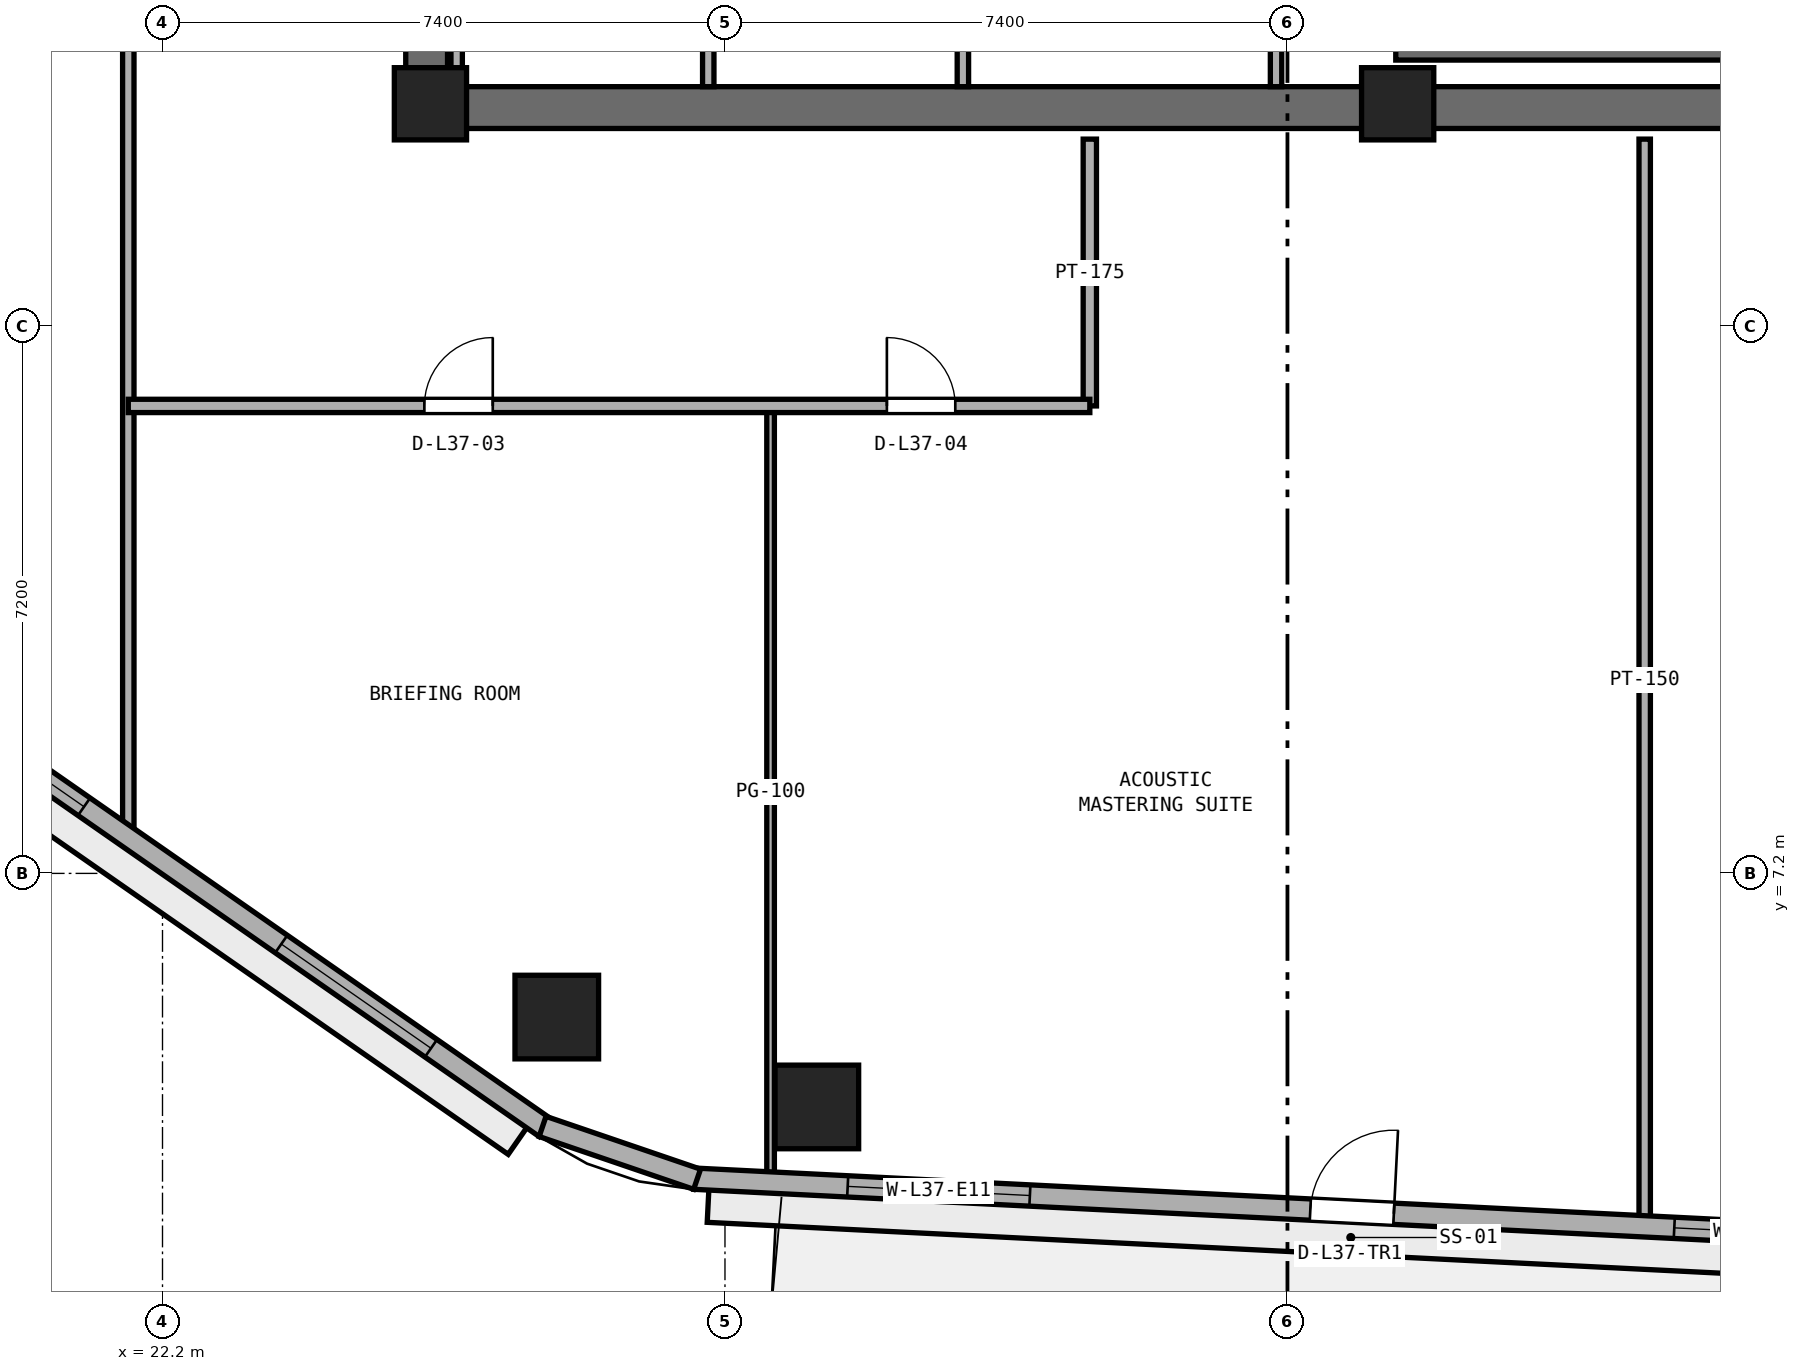
"""IFC4 building model, lengths in metres.
Left out: names, types, materials, properties, quantities, classifications, styles, units other than length and angle.
Written with IfcOpenShell. Run it as: python <this file> out.ifc"""

import sys

from ifc_helpers import new_model, si_unit, direction, frame, frame_2d, origin, origin_2d, place, context, subcontext, project, spatial, rectangle, extrude, element, fill, save


model = new_model("IFC4")
c1 = context("Model", 3, precision=1e-05, world=origin(), true_north=direction((0.0, 1.0)))
c2 = subcontext(c1, "Body", "Model", "MODEL_VIEW")
j1 = project(units=[si_unit("LENGTHUNIT", "METRE"), si_unit("PLANEANGLEUNIT", "RADIAN")], contexts=[c1])
p1 = place(None, origin())
s1 = spatial("IfcSite", under=j1, at=p1, CompositionType="ELEMENT")
p2 = place(p1, origin())
s2 = spatial("IfcBuilding", under=s1, at=p2, CompositionType="ELEMENT")
p3 = place(p2, frame((0.0, 0.0, 147.8)))
s3 = spatial("IfcBuildingStorey", under=s2, at=p3, CompositionType="ELEMENT", Elevation=147.8)
p4 = place(p3, frame((25.4, 17.275, 0.0), z_axis=(0.0, 0.0, 1.0), x_axis=(1.0, 0.0, 0.0)))
e1 = element("IfcWall", 1, at=p4, inside=s3, PredefinedType="SHEAR", context=c2, shape_type="SweptSolid", body=[
    extrude(rectangle(XDim=23.2, YDim=0.55, at=frame_2d((11.6, 0.0))), origin(), (0.0, 0.0, 1.0), 3.54),
])
p5 = place(p3, frame((25.675, 17.55, 0.0), z_axis=(0.0, 0.0, 1.0), x_axis=(0.0, 1.0, 0.0)))
e2 = element("IfcWall", 2, at=p5, inside=s3, PredefinedType="SHEAR", context=c2, shape_type="SweptSolid", body=[
    extrude(rectangle(XDim=15.3, YDim=0.55, at=frame_2d((7.65, 0.0))), origin(), (0.0, 0.0, 1.0), 3.54),
])
p6 = place(p5, frame((6.9, 0.0, 0.0)))
e3 = element("IfcOpeningElement", 3, at=p6, cuts=e2, PredefinedType="OPENING", context=c2, shape_type="SweptSolid", body=[
    extrude(rectangle(XDim=1.5, YDim=2.15, at=frame_2d((0.75, 1.075))), frame((0.0, 0.285, 0.0), z_axis=(0.0, -1.0, 0.0), x_axis=(1.0, 0.0, 0.0)), (0.0, 0.0, 1.0), 0.57),
])
for number, where, z_axis, x_axis in (
    (4, (25.725, 17.325, 0.0), (0.0, 0.0, 1.0), (1.0, 0.0, 0.0)),
    (5, (38.45, 17.325, 0.0), (0.0, 0.0, 1.0), (1.0, 0.0, 0.0)),
):
    element("IfcColumn", number, at=place(p3, frame(where, z_axis=z_axis, x_axis=x_axis)), inside=s3, PredefinedType="PILASTER", context=c2, shape_type="SweptSolid", body=[
        extrude(rectangle(XDim=0.95, YDim=0.95, at=origin_2d()), origin(), (0.0, 0.0, 1.0), 3.8),
    ])
for number, where, z_axis, x_axis in (
    (6, (30.809, 4.127, 0.0), (0.0, 0.0, 1.0), (1.0, 0.0, 0.0)),
    (7, (27.387, 5.31, 0.0), (0.0, 0.0, 1.0), (1.0, 0.0, 0.0)),
):
    element("IfcColumn", number, at=place(p3, frame(where, z_axis=z_axis, x_axis=x_axis)), inside=s3, PredefinedType="COLUMN", context=c2, shape_type="SweptSolid", body=[
        extrude(rectangle(XDim=1.1, YDim=1.1, at=origin_2d()), origin(), (0.0, 0.0, 1.0), 3.8),
    ])
p7 = place(p3, frame((38.425, 18.025, 0.0), z_axis=(0.0, 0.0, 1.0), x_axis=(1.0, 0.0, 0.0)))
e8 = element("IfcWall", 8, at=p7, inside=s3, PredefinedType="SHEAR", context=c2, shape_type="SweptSolid", body=[
    extrude(rectangle(XDim=7.3, YDim=0.25, at=frame_2d((3.65, 0.0))), origin(), (0.0, 0.0, 1.0), 3.54),
])
p8 = place(p3, frame((26.07, 17.55, 0.0), z_axis=(0.0, 0.0, 1.0), x_axis=(0.0, 1.0, 0.0)))
e9 = element("IfcWall", 9, at=p8, inside=s3, PredefinedType="PARTITIONING", context=c2, shape_type="SweptSolid", body=[
    extrude(rectangle(XDim=2.2, YDim=0.15, at=frame_2d((1.1, 0.0))), origin(), (0.0, 0.0, 1.0), 2.64),
])
for number, where, z_axis, x_axis in (
    (10, (29.38, 17.55, 0.0), (0.0, 0.0, 1.0), (0.0, 1.0, 0.0)),
    (11, (32.73, 17.55, 0.0), (0.0, 0.0, 1.0), (0.0, 1.0, 0.0)),
    (12, (36.85, 17.55, 0.0), (0.0, 0.0, 1.0), (0.0, 1.0, 0.0)),
):
    element("IfcWall", number, at=place(p3, frame(where, z_axis=z_axis, x_axis=x_axis)), inside=s3, PredefinedType="PARTITIONING", context=c2, shape_type="SweptSolid", body=[
        extrude(rectangle(XDim=2.2, YDim=0.15, at=frame_2d((1.1, 0.0))), origin(), (0.0, 0.0, 1.0), 3.54),
    ])
p9 = place(p3, frame((41.7, 2.621, 0.0), z_axis=(0.0, 0.0, 1.0), x_axis=(0.0, 1.0, 0.0)))
e13 = element("IfcWall", 13, at=p9, inside=s3, PredefinedType="PARTITIONING", context=c2, shape_type="SweptSolid", body=[
    extrude(rectangle(XDim=14.239, YDim=0.15, at=frame_2d((7.119, 0.0))), origin(), (0.0, 0.0, 1.0), 3.54),
])
p10 = place(p3, frame((34.4, 13.35, 0.0), z_axis=(0.0, 0.0, 1.0), x_axis=(0.0, 1.0, 0.0)))
e14 = element("IfcWall", 14, at=p10, inside=s3, PredefinedType="PARTITIONING", context=c2, shape_type="SweptSolid", body=[
    extrude(rectangle(XDim=3.51, YDim=0.175, at=frame_2d((1.755, 0.0))), origin(), (0.0, 0.0, 1.0), 3.54),
])
p11 = place(p3, frame((30.2, 3.198, 0.0), z_axis=(0.0, 0.0, 1.0), x_axis=(0.0, 1.0, 0.0)))
e15 = element("IfcWall", 15, at=p11, inside=s3, PredefinedType="PARTITIONING", context=c2, shape_type="SweptSolid", body=[
    extrude(rectangle(XDim=10.152, YDim=0.1, at=frame_2d((5.076, 0.0))), origin(), (0.0, 0.0, 1.0), 3.54),
])
p12 = place(p3, frame((21.75, 7.641, 0.0), z_axis=(0.0, 0.0, 1.0), x_axis=(0.0, 1.0, 0.0)))
e16 = element("IfcWall", 16, at=p12, inside=s3, PredefinedType="PARTITIONING", context=c2, shape_type="SweptSolid", body=[
    extrude(rectangle(XDim=16.209, YDim=0.15, at=frame_2d((8.104, 0.0))), origin(), (0.0, 0.0, 1.0), 3.54),
])
p13 = place(p12, frame((10.389, 0.0, 0.0)))
e17 = element("IfcOpeningElement", 17, at=p13, cuts=e16, PredefinedType="OPENING", context=c2, shape_type="SweptSolid", body=[
    extrude(rectangle(XDim=0.9, YDim=2.1, at=frame_2d((0.45, 1.05))), frame((0.0, 0.085, 0.0), z_axis=(0.0, -1.0, 0.0), x_axis=(1.0, 0.0, 0.0)), (0.0, 0.0, 1.0), 0.17),
])
p14 = place(p3, frame((21.75, 13.35, 0.0), z_axis=(0.0, 0.0, 1.0), x_axis=(1.0, 0.0, 0.0)))
e18 = element("IfcWall", 18, at=p14, inside=s3, PredefinedType="PARTITIONING", context=c2, shape_type="SweptSolid", body=[
    extrude(rectangle(XDim=12.65, YDim=0.175, at=frame_2d((6.325, 0.0))), origin(), (0.0, 0.0, 1.0), 3.54),
])
p15 = place(p14, frame((3.895, 0.0, 0.0)))
e19 = element("IfcOpeningElement", 19, at=p15, cuts=e18, PredefinedType="OPENING", context=c2, shape_type="SweptSolid", body=[
    extrude(rectangle(XDim=0.9, YDim=2.1, at=frame_2d((0.45, 1.05))), frame((0.0, 0.097, 0.0), z_axis=(0.0, -1.0, 0.0), x_axis=(1.0, 0.0, 0.0)), (0.0, 0.0, 1.0), 0.195),
])
p16 = place(p14, frame((9.98, 0.0, 0.0)))
e20 = element("IfcOpeningElement", 20, at=p16, cuts=e18, PredefinedType="OPENING", context=c2, shape_type="SweptSolid", body=[
    extrude(rectangle(XDim=0.9, YDim=2.1, at=frame_2d((0.45, 1.05))), frame((0.0, 0.097, 0.0), z_axis=(0.0, -1.0, 0.0), x_axis=(1.0, 0.0, 0.0)), (0.0, 0.0, 1.0), 0.195),
])
p17 = place(p3, frame((29.195, 3.184, 0.0), z_axis=(0.0, 0.0, 1.0), x_axis=(0.998743400978, -0.05011605535, 0.0)))
e21 = element("IfcWall", 21, at=p17, inside=s3, PredefinedType="STANDARD", context=c2, shape_type="SweptSolid", body=[
    extrude(rectangle(XDim=17.333, YDim=0.28, at=frame_2d((8.667, 0.0))), origin(), (0.0, 0.0, 1.0), 3.54),
])
p18 = place(p17, frame((8.116, 0.0, 0.0)))
e22 = element("IfcOpeningElement", 22, at=p18, cuts=e21, PredefinedType="OPENING", context=c2, shape_type="SweptSolid", body=[
    extrude(rectangle(XDim=1.1, YDim=2.2, at=frame_2d((0.55, 1.1))), frame((0.0, 0.15, 0.0), z_axis=(0.0, -1.0, 0.0), x_axis=(1.0, 0.0, 0.0)), (0.0, 0.0, 1.0), 0.3),
])
p19 = place(p17, frame((2.022, 0.0, 0.9)))
e23 = element("IfcOpeningElement", 23, at=p19, cuts=e21, PredefinedType="OPENING", context=c2, shape_type="SweptSolid", body=[
    extrude(rectangle(XDim=2.4, YDim=1.75, at=frame_2d((1.2, 0.875))), frame((0.0, 0.15, 0.0), z_axis=(0.0, -1.0, 0.0), x_axis=(1.0, 0.0, 0.0)), (0.0, 0.0, 1.0), 0.3),
])
p20 = place(p17, frame((12.911, 0.0, 0.9)))
e24 = element("IfcOpeningElement", 24, at=p20, cuts=e21, PredefinedType="OPENING", context=c2, shape_type="SweptSolid", body=[
    extrude(rectangle(XDim=2.4, YDim=1.75, at=frame_2d((1.2, 0.875))), frame((0.0, 0.15, 0.0), z_axis=(0.0, -1.0, 0.0), x_axis=(1.0, 0.0, 0.0)), (0.0, 0.0, 1.0), 0.3),
])
p21 = place(p3, frame((13.952, 13.101, 0.0), z_axis=(0.0, 0.0, 1.0), x_axis=(0.820698239491, -0.571361881558, 0.0)))
e25 = element("IfcWall", 25, at=p21, inside=s3, PredefinedType="STANDARD", context=c2, shape_type="SweptSolid", body=[
    extrude(rectangle(XDim=16.186, YDim=0.28, at=frame_2d((8.093, 0.0))), origin(), (0.0, 0.0, 1.0), 3.54),
])
p22 = place(p21, frame((1.831, 0.0, 0.9)))
e26 = element("IfcOpeningElement", 26, at=p22, cuts=e25, PredefinedType="OPENING", context=c2, shape_type="SweptSolid", body=[
    extrude(rectangle(XDim=2.4, YDim=1.75, at=frame_2d((1.2, 0.875))), frame((0.0, 0.15, 0.0), z_axis=(0.0, -1.0, 0.0), x_axis=(1.0, 0.0, 0.0)), (0.0, 0.0, 1.0), 0.3),
])
p23 = place(p21, frame((6.393, 0.0, 0.9)))
e27 = element("IfcOpeningElement", 27, at=p23, cuts=e25, PredefinedType="OPENING", context=c2, shape_type="SweptSolid", body=[
    extrude(rectangle(XDim=2.4, YDim=1.75, at=frame_2d((1.2, 0.875))), frame((0.0, 0.15, 0.0), z_axis=(0.0, -1.0, 0.0), x_axis=(1.0, 0.0, 0.0)), (0.0, 0.0, 1.0), 0.3),
])
p24 = place(p21, frame((11.955, 0.0, 0.9)))
e28 = element("IfcOpeningElement", 28, at=p24, cuts=e25, PredefinedType="OPENING", context=c2, shape_type="SweptSolid", body=[
    extrude(rectangle(XDim=2.4, YDim=1.75, at=frame_2d((1.2, 0.875))), frame((0.0, 0.15, 0.0), z_axis=(0.0, -1.0, 0.0), x_axis=(1.0, 0.0, 0.0)), (0.0, 0.0, 1.0), 0.3),
])
p25 = place(p3, frame((27.2, 3.871, 0.0), z_axis=(0.0, 0.0, 1.0), x_axis=(0.946327814955, -0.323208395068, 0.0)))
e29 = element("IfcWall", 29, at=p25, inside=s3, PredefinedType="STANDARD", context=c2, shape_type="SweptSolid", body=[
    extrude(rectangle(XDim=2.148, YDim=0.28, at=frame_2d((1.074, 0.0))), origin(), (0.0, 0.0, 1.0), 3.54),
])
p26 = place(p15, origin())
e30 = element("IfcDoor", 30, at=p26, inside=s3, OperationType="SINGLE_SWING_RIGHT", PredefinedType="DOOR", context=c2, shape_type="SweptSolid", body=[
    extrude(rectangle(XDim=0.9, YDim=2.1, at=frame_2d((0.45, 1.05))), frame((0.0, 0.025, 0.0), z_axis=(0.0, -1.0, 0.0), x_axis=(1.0, 0.0, 0.0)), (0.0, 0.0, 1.0), 0.05),
])
fill(e19, e30)
p27 = place(p16, origin())
e31 = element("IfcDoor", 31, at=p27, inside=s3, OperationType="SINGLE_SWING_LEFT", PredefinedType="DOOR", context=c2, shape_type="SweptSolid", body=[
    extrude(rectangle(XDim=0.9, YDim=2.1, at=frame_2d((0.45, 1.05))), frame((0.0, 0.025, 0.0), z_axis=(0.0, -1.0, 0.0), x_axis=(1.0, 0.0, 0.0)), (0.0, 0.0, 1.0), 0.05),
])
fill(e20, e31)
p28 = place(p18, origin())
e32 = element("IfcDoor", 32, at=p28, inside=s3, OperationType="SINGLE_SWING_RIGHT", PredefinedType="DOOR", context=c2, shape_type="SweptSolid", body=[
    extrude(rectangle(XDim=1.1, YDim=2.2, at=frame_2d((0.55, 1.1))), frame((0.0, 0.025, 0.0), z_axis=(0.0, -1.0, 0.0), x_axis=(1.0, 0.0, 0.0)), (0.0, 0.0, 1.0), 0.05),
])
fill(e22, e32)
p29 = place(p19, origin())
e33 = element("IfcWindow", 33, at=p29, inside=s3, PartitioningType="SINGLE_PANEL", PredefinedType="WINDOW", context=c2, shape_type="SweptSolid", body=[
    extrude(rectangle(XDim=2.4, YDim=1.75, at=frame_2d((1.2, 0.875))), frame((0.0, 0.03, 0.0), z_axis=(0.0, -1.0, 0.0), x_axis=(1.0, 0.0, 0.0)), (0.0, 0.0, 1.0), 0.06),
])
fill(e23, e33)
p30 = place(p20, origin())
e34 = element("IfcWindow", 34, at=p30, inside=s3, PartitioningType="SINGLE_PANEL", PredefinedType="WINDOW", context=c2, shape_type="SweptSolid", body=[
    extrude(rectangle(XDim=2.4, YDim=1.75, at=frame_2d((1.2, 0.875))), frame((0.0, 0.03, 0.0), z_axis=(0.0, -1.0, 0.0), x_axis=(1.0, 0.0, 0.0)), (0.0, 0.0, 1.0), 0.06),
])
fill(e24, e34)
p31 = place(p23, origin())
e35 = element("IfcWindow", 35, at=p31, inside=s3, PartitioningType="SINGLE_PANEL", PredefinedType="WINDOW", context=c2, shape_type="SweptSolid", body=[
    extrude(rectangle(XDim=2.4, YDim=1.75, at=frame_2d((1.2, 0.875))), frame((0.0, 0.03, 0.0), z_axis=(0.0, -1.0, 0.0), x_axis=(1.0, 0.0, 0.0)), (0.0, 0.0, 1.0), 0.06),
])
fill(e27, e35)
p32 = place(p24, origin())
e36 = element("IfcWindow", 36, at=p32, inside=s3, PartitioningType="SINGLE_PANEL", PredefinedType="WINDOW", context=c2, shape_type="SweptSolid", body=[
    extrude(rectangle(XDim=2.4, YDim=1.75, at=frame_2d((1.2, 0.875))), frame((0.0, 0.03, 0.0), z_axis=(0.0, -1.0, 0.0), x_axis=(1.0, 0.0, 0.0)), (0.0, 0.0, 1.0), 0.06),
])
fill(e28, e36)
save(model, sys.argv[1])
